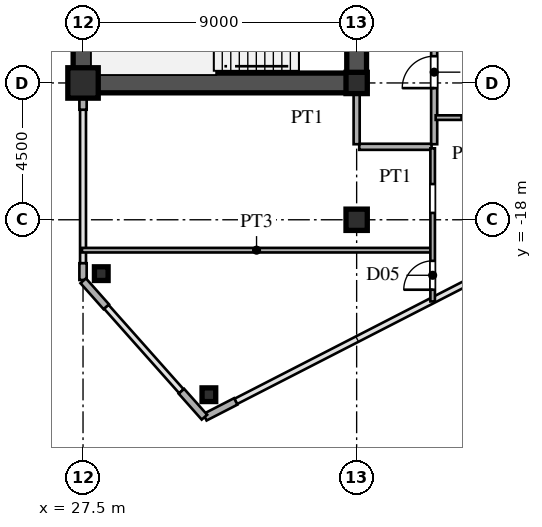
"""IFC4 building model, lengths in metres.
Left out: names, types, materials, properties, quantities, classifications, styles, units other than length and angle.
Written with IfcOpenShell. Run it as: python <this file> out.ifc"""

import sys

from ifc_helpers import new_model, si_unit, direction, frame, frame_2d, origin, origin_2d, place, context, subcontext, project, spatial, rectangle, hollow_rectangle, i_section, extrude, source, transform, mapped, element, fill, save


model = new_model("IFC4")
c1 = context("Model", 3, precision=1e-05, world=origin(), true_north=direction((0.0, 1.0)))
c2 = subcontext(c1, "Body", "Model", "MODEL_VIEW")
j1 = project(units=[si_unit("LENGTHUNIT", "METRE"), si_unit("PLANEANGLEUNIT", "RADIAN")], contexts=[c1])
p1 = place(None, origin())
s1 = spatial("IfcSite", under=j1, at=p1, CompositionType="ELEMENT")
p2 = place(p1, origin())
s2 = spatial("IfcBuilding", under=s1, at=p2, CompositionType="ELEMENT")
p3 = place(p2, frame((0.0, 0.0, 132.0)))
s3 = spatial("IfcBuildingStorey", under=s2, at=p3, CompositionType="ELEMENT", Elevation=132.0)
m1 = source(origin(), c2, "Body", "SweptSolid", [
    extrude(hollow_rectangle(XDim=1.0, YDim=1.0, WallThickness=0.042, at=origin_2d()), origin(), (0.0, 0.0, 1.0), 3.6),
])
p4 = place(p3, frame((27.5, -13.5, 0.0), z_axis=(0.0, 0.0, 1.0), x_axis=(1.0, 0.0, 0.0)))
e1 = element("IfcColumn", 1, at=p4, inside=s3, PredefinedType="COLUMN", context=c2, shape_type="MappedRepresentation", body=[
    mapped(m1, transform((0.0, 0.0, 0.0), scale=1.0)),
])
m2 = source(origin(), c2, "Body", "SweptSolid", [
    extrude(i_section(OverallWidth=0.7, OverallDepth=0.7, WebThickness=0.028, FlangeThickness=0.045, at=origin_2d()), origin(), (0.0, 0.0, 1.0), 3.6),
])
for number, where, z_axis, x_axis in (
    (2, (36.5, -18.0, 0.0), (0.0, 0.0, 1.0), (1.0, 0.0, 0.0)),
    (3, (36.5, -13.5, 0.0), (0.0, 0.0, 1.0), (1.0, 0.0, 0.0)),
):
    element("IfcColumn", number, at=place(p3, frame(where, z_axis=z_axis, x_axis=x_axis)), inside=s3, PredefinedType="COLUMN", context=c2, shape_type="MappedRepresentation", body=[
        mapped(m2, transform((0.0, 0.0, 0.0), scale=1.0)),
    ])
m3 = source(origin(), c2, "Body", "SweptSolid", [
    extrude(hollow_rectangle(XDim=0.45, YDim=0.45, WallThickness=0.018, at=origin_2d()), origin(), (0.0, 0.0, 1.0), 3.6),
])
for number, where, z_axis, x_axis in (
    (4, (31.64, -23.754, 0.0), (0.0, 0.0, 1.0), (1.0, 0.0, 0.0)),
    (5, (28.1, -19.772, 0.0), (0.0, 0.0, 1.0), (1.0, 0.0, 0.0)),
):
    element("IfcColumn", number, at=place(p3, frame(where, z_axis=z_axis, x_axis=x_axis)), inside=s3, PredefinedType="COLUMN", context=c2, shape_type="MappedRepresentation", body=[
        mapped(m3, transform((0.0, 0.0, 0.0), scale=1.0)),
    ])
p5 = place(p3, frame((31.509, -24.495, 0.0), z_axis=(0.0, 0.0, 1.0), x_axis=(0.889797395748, 0.456355776255, 0.0)))
e6 = element("IfcWall", 6, at=p5, inside=s3, PredefinedType="SOLIDWALL", context=c2, shape_type="SweptSolid", body=[
    extrude(rectangle(XDim=1.14, YDim=0.24, at=frame_2d((0.57, 0.0))), origin(), (0.0, 0.0, 1.0), 3.34),
])
p6 = place(p3, frame((27.5, -19.98, 0.0), z_axis=(0.0, 0.0, 1.0), x_axis=(0.0, 1.0, 0.0)))
e7 = element("IfcWall", 7, at=p6, inside=s3, PredefinedType="SOLIDWALL", context=c2, shape_type="SweptSolid", body=[
    extrude(rectangle(XDim=0.55, YDim=0.24, at=frame_2d((0.275, 0.0))), origin(), (0.0, 0.0, 1.0), 3.34),
])
p7 = place(p3, frame((27.5, -14.38, 0.0), z_axis=(0.0, 0.0, 1.0), x_axis=(0.0, 1.0, 0.0)))
e8 = element("IfcWall", 8, at=p7, inside=s3, PredefinedType="SOLIDWALL", context=c2, shape_type="SweptSolid", body=[
    extrude(rectangle(XDim=0.55, YDim=0.24, at=frame_2d((0.275, 0.0))), origin(), (0.0, 0.0, 1.0), 2.79),
])
for number, where, z_axis, x_axis in (
    (9, (27.507, -20.008, 0.0), (0.0, 0.0, 1.0), (0.664, -0.747, 0.0)),
    (10, (30.736, -23.64, 0.0), (0.0, 0.0, 1.0), (0.664, -0.747, 0.0)),
):
    element("IfcWall", number, at=place(p3, frame(where, z_axis=z_axis, x_axis=x_axis)), inside=s3, PredefinedType="SOLIDWALL", context=c2, shape_type="SweptSolid", body=[
        extrude(rectangle(XDim=1.14, YDim=0.24, at=frame_2d((0.57, 0.0))), origin(), (0.0, 0.0, 1.0), 3.34),
    ])
p8 = place(p3, frame((27.5, -13.5, 0.0), z_axis=(0.0, 0.0, 1.0), x_axis=(0.0, 1.0, 0.0)))
e11 = element("IfcWall", 11, at=p8, inside=s3, PredefinedType="SHEAR", context=c2, shape_type="SweptSolid", body=[
    extrude(rectangle(XDim=12.2, YDim=0.65, at=frame_2d((6.1, 0.0))), origin(), (0.0, 0.0, 1.0), 3.34),
])
p9 = place(p3, frame((27.5, -13.5, 0.0), z_axis=(0.0, 0.0, 1.0), x_axis=(1.0, 0.0, 0.0)))
e12 = element("IfcWall", 12, at=p9, inside=s3, PredefinedType="SHEAR", context=c2, shape_type="SweptSolid", body=[
    extrude(rectangle(XDim=9.0, YDim=0.65, at=frame_2d((4.5, 0.0))), origin(), (0.0, 0.0, 1.0), 3.34),
])
p10 = place(p3, frame((36.5, -13.65, 0.0), z_axis=(0.0, 0.0, 1.0), x_axis=(0.0, 1.0, 0.0)))
e13 = element("IfcWall", 13, at=p10, inside=s3, PredefinedType="SHEAR", context=c2, shape_type="SweptSolid", body=[
    extrude(rectangle(XDim=7.15, YDim=0.65, at=frame_2d((3.575, 0.0))), origin(), (0.0, 0.0, 1.0), 3.34),
])
p11 = place(p10, frame((4.675, 0.0, 0.0)))
e14 = element("IfcOpeningElement", 14, at=p11, cuts=e13, PredefinedType="OPENING", context=c2, shape_type="SweptSolid", body=[
    extrude(rectangle(XDim=1.15, YDim=2.2, at=frame_2d((0.575, 1.1))), frame((0.0, 0.335, 0.0), z_axis=(0.0, -1.0, 0.0), x_axis=(1.0, 0.0, 0.0)), (0.0, 0.0, 1.0), 0.67),
])
p12 = place(p3, frame((27.465, -19.0, 0.0), z_axis=(0.0, 0.0, 1.0), x_axis=(1.0, 0.0, 0.0)))
e15 = element("IfcWall", 15, at=p12, inside=s3, PredefinedType="PARTITIONING", context=c2, shape_type="SweptSolid", body=[
    extrude(rectangle(XDim=11.485, YDim=0.15, at=frame_2d((5.742, 0.0))), origin(), (0.0, 0.0, 1.0), 3.34),
])
p13 = place(p3, frame((36.585, -15.6, 0.0), z_axis=(0.0, 0.0, 1.0), x_axis=(1.0, 0.0, 0.0)))
e16 = element("IfcWall", 16, at=p13, inside=s3, PredefinedType="PARTITIONING", context=c2, shape_type="SweptSolid", body=[
    extrude(rectangle(XDim=2.38, YDim=0.2, at=frame_2d((1.19, 0.0))), origin(), (0.0, 0.0, 1.0), 3.34),
])
p14 = place(p3, frame((39.1, -14.64, 0.0), z_axis=(0.0, 0.0, 1.0), x_axis=(1.0, 0.0, 0.0)))
e17 = element("IfcWall", 17, at=p14, inside=s3, PredefinedType="PARTITIONING", context=c2, shape_type="SweptSolid", body=[
    extrude(rectangle(XDim=2.65, YDim=0.15, at=frame_2d((1.325, 0.0))), origin(), (0.0, 0.0, 1.0), 3.34),
])
p15 = place(p14, frame((0.85, 0.0, 0.0)))
e18 = element("IfcOpeningElement", 18, at=p15, cuts=e17, PredefinedType="OPENING", context=c2, shape_type="SweptSolid", body=[
    extrude(rectangle(XDim=0.95, YDim=2.15, at=frame_2d((0.475, 1.075))), frame((0.0, 0.085, 0.0), z_axis=(0.0, -1.0, 0.0), x_axis=(1.0, 0.0, 0.0)), (0.0, 0.0, 1.0), 0.17),
])
p16 = place(p3, frame((36.5, -15.515, 0.0), z_axis=(0.0, 0.0, 1.0), x_axis=(0.0, 1.0, 0.0)))
e19 = element("IfcWall", 19, at=p16, inside=s3, PredefinedType="PARTITIONING", context=c2, shape_type="SweptSolid", body=[
    extrude(rectangle(XDim=1.685, YDim=0.2, at=frame_2d((0.842, 0.0))), origin(), (0.0, 0.0, 1.0), 2.44),
])
p17 = place(p3, frame((39.0, -20.686, 0.0), z_axis=(0.0, 0.0, 1.0), x_axis=(0.0, 1.0, 0.0)))
e20 = element("IfcWall", 20, at=p17, inside=s3, PredefinedType="PARTITIONING", context=c2, shape_type="SweptSolid", body=[
    extrude(rectangle(XDim=5.036, YDim=0.15, at=frame_2d((2.518, 0.0))), origin(), (0.0, 0.0, 1.0), 3.34),
])
p18 = place(p17, frame((0.385, 0.0, 0.0)))
e21 = element("IfcOpeningElement", 21, at=p18, cuts=e20, PredefinedType="OPENING", context=c2, shape_type="SweptSolid", body=[
    extrude(rectangle(XDim=0.95, YDim=2.15, at=frame_2d((0.475, 1.075))), frame((0.0, 0.085, 0.0), z_axis=(0.0, -1.0, 0.0), x_axis=(1.0, 0.0, 0.0)), (0.0, 0.0, 1.0), 0.17),
])
p19 = place(p17, frame((2.911, 0.0, 0.0)))
e22 = element("IfcOpeningElement", 22, at=p19, cuts=e20, PredefinedType="OPENING", context=c2, shape_type="SweptSolid", body=[
    extrude(rectangle(XDim=0.95, YDim=2.15, at=frame_2d((0.475, 1.075))), frame((0.0, 0.085, 0.0), z_axis=(0.0, -1.0, 0.0), x_axis=(1.0, 0.0, 0.0)), (0.0, 0.0, 1.0), 0.17),
])
p20 = place(p3, frame((39.05, -15.515, 0.0), z_axis=(0.0, 0.0, 1.0), x_axis=(0.0, 1.0, 0.0)))
e23 = element("IfcWall", 23, at=p20, inside=s3, PredefinedType="PARTITIONING", context=c2, shape_type="SweptSolid", body=[
    extrude(rectangle(XDim=31.03, YDim=0.2, at=frame_2d((15.515, 0.0))), origin(), (0.0, 0.0, 1.0), 3.34),
])
p21 = place(p20, frame((1.845, 0.0, 0.0)))
e24 = element("IfcOpeningElement", 24, at=p21, cuts=e23, PredefinedType="OPENING", context=c2, shape_type="SweptSolid", body=[
    extrude(rectangle(XDim=1.05, YDim=2.25, at=frame_2d((0.525, 1.125))), frame((0.0, 0.11, 0.0), z_axis=(0.0, -1.0, 0.0), x_axis=(1.0, 0.0, 0.0)), (0.0, 0.0, 1.0), 0.22),
])
p22 = place(p20, frame((12.78, 0.0, 0.0)))
e25 = element("IfcOpeningElement", 25, at=p22, cuts=e23, PredefinedType="OPENING", context=c2, shape_type="SweptSolid", body=[
    extrude(rectangle(XDim=1.05, YDim=2.25, at=frame_2d((0.525, 1.125))), frame((0.0, 0.11, 0.0), z_axis=(0.0, -1.0, 0.0), x_axis=(1.0, 0.0, 0.0)), (0.0, 0.0, 1.0), 0.22),
])
p23 = place(p20, frame((25.29, 0.0, 0.0)))
e26 = element("IfcOpeningElement", 26, at=p23, cuts=e23, PredefinedType="OPENING", context=c2, shape_type="SweptSolid", body=[
    extrude(rectangle(XDim=1.05, YDim=2.25, at=frame_2d((0.525, 1.125))), frame((0.0, 0.11, 0.0), z_axis=(0.0, -1.0, 0.0), x_axis=(1.0, 0.0, 0.0)), (0.0, 0.0, 1.0), 0.22),
])
m4 = source(origin(), c2, "Body", "SweptSolid", [
    extrude(rectangle(XDim=0.95, YDim=2.15, at=frame_2d((0.475, 1.075))), frame((0.0, 0.025, 0.0), z_axis=(0.0, -1.0, 0.0), x_axis=(1.0, 0.0, 0.0)), (0.0, 0.0, 1.0), 0.05),
])
p24 = place(p18, origin())
e27 = element("IfcDoor", 27, at=p24, inside=s3, OperationType="SINGLE_SWING_LEFT", PredefinedType="DOOR", context=c2, shape_type="MappedRepresentation", body=[
    mapped(m4, transform((0.0, 0.0, 0.0), scale=1.0)),
])
fill(e21, e27)
m5 = source(origin(), c2, "Body", "SweptSolid", [
    extrude(rectangle(XDim=1.05, YDim=2.25, at=frame_2d((0.525, 1.125))), frame((0.0, 0.025, 0.0), z_axis=(0.0, -1.0, 0.0), x_axis=(1.0, 0.0, 0.0)), (0.0, 0.0, 1.0), 0.05),
])
p25 = place(p21, origin())
e28 = element("IfcDoor", 28, at=p25, inside=s3, OperationType="SINGLE_SWING_LEFT", PredefinedType="DOOR", context=c2, shape_type="MappedRepresentation", body=[
    mapped(m5, transform((0.0, 0.0, 0.0), scale=1.0)),
])
fill(e24, e28)
save(model, sys.argv[1])
